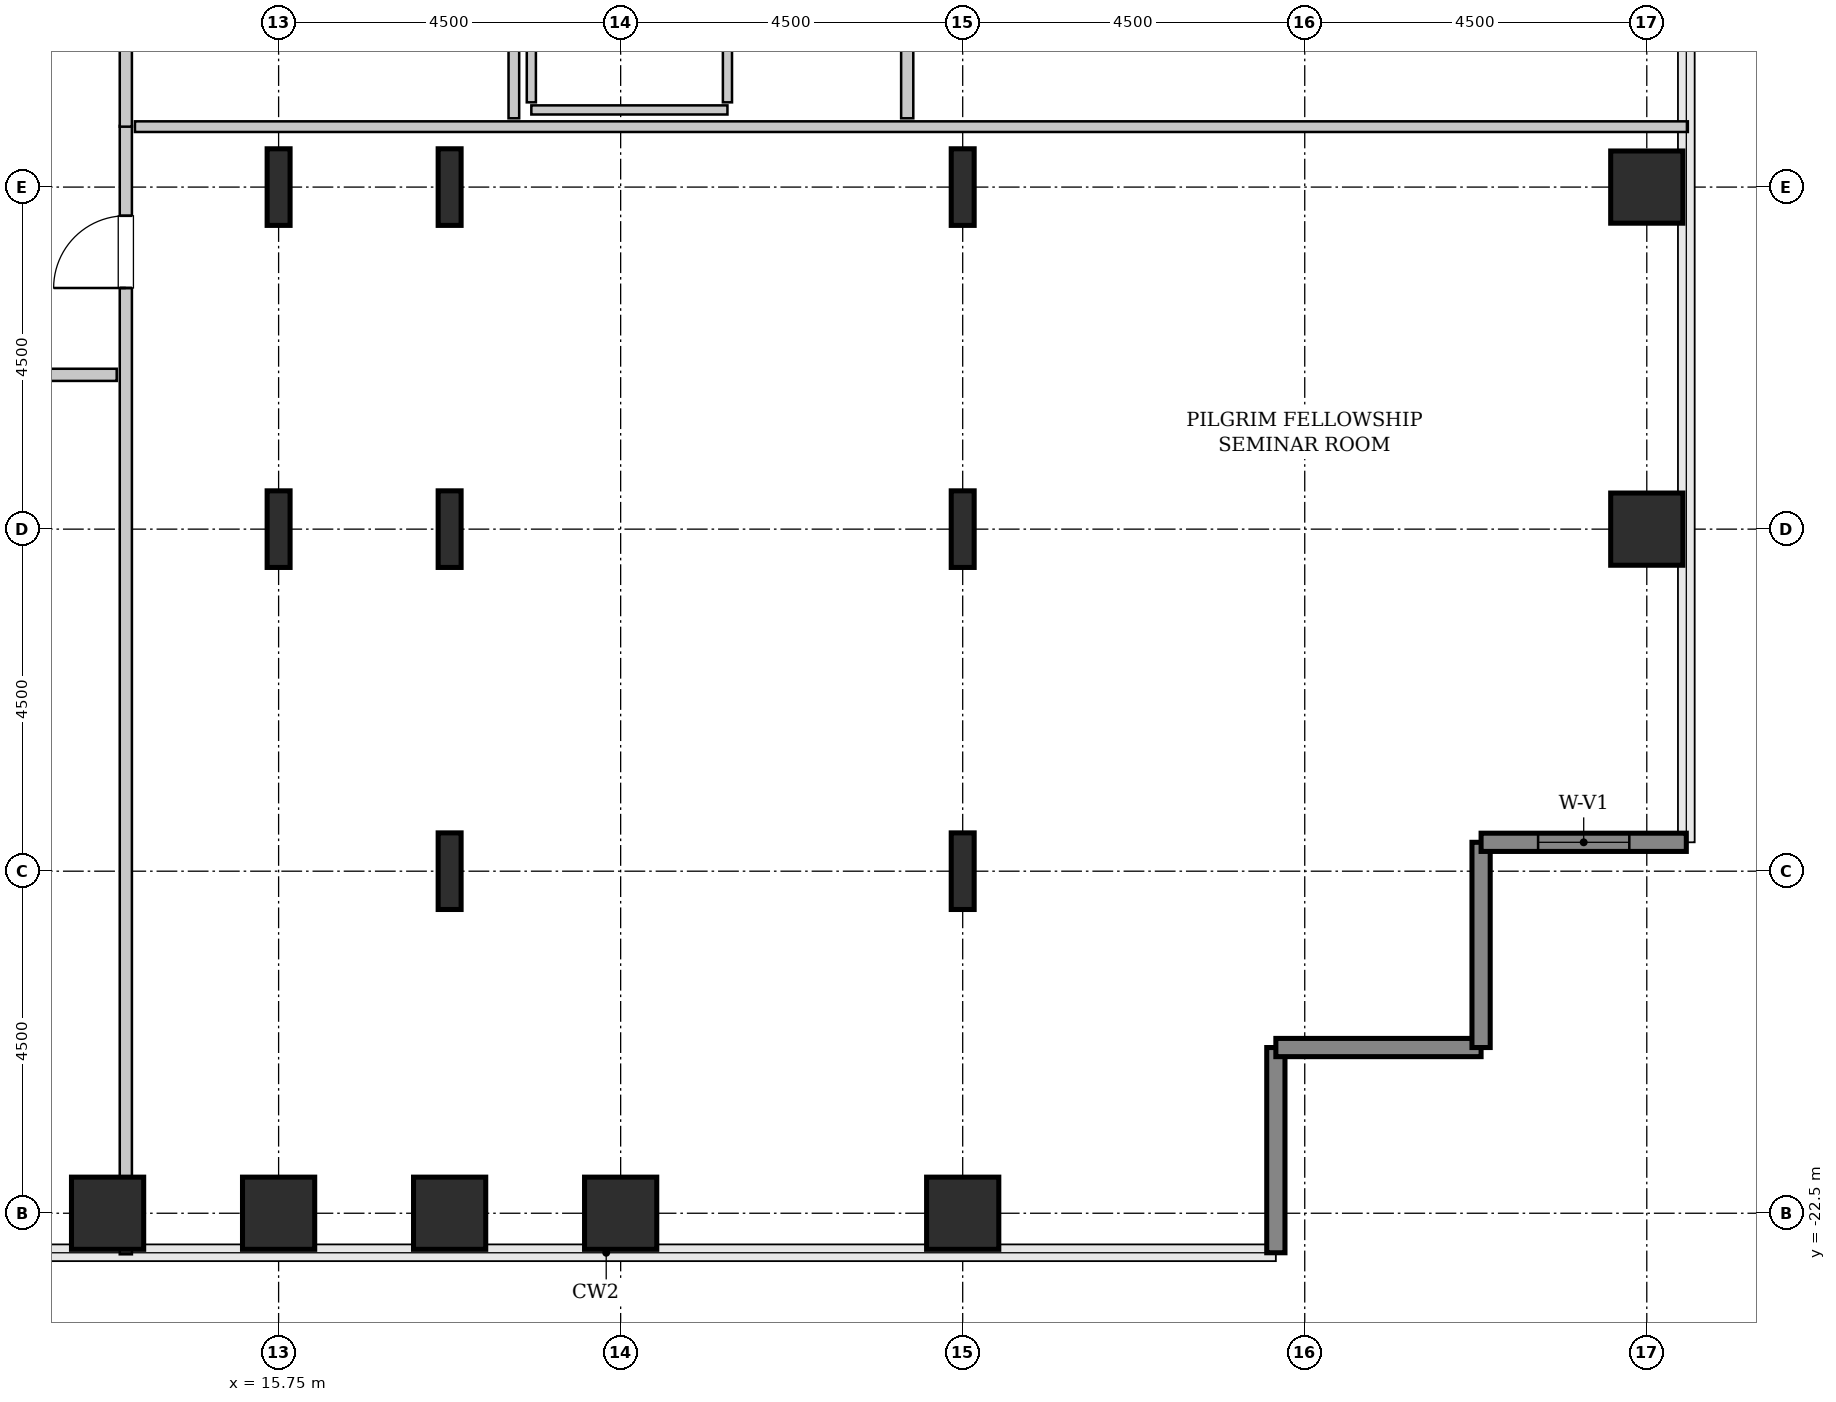
"""IFC4 building model, lengths in metres.
Left out: names, types, materials, properties, quantities, classifications, styles, units other than length and angle.
Written with IfcOpenShell. Run it as: python <this file> out.ifc"""

import sys

from ifc_helpers import new_model, si_unit, direction, frame, frame_2d, origin, origin_2d, place, context, subcontext, project, spatial, rectangle, hollow_rectangle, i_section, extrude, source, transform, mapped, element, fill, save


model = new_model("IFC4")
c1 = context("Model", 3, precision=1e-05, world=origin(), true_north=direction((0.0, 1.0)))
c2 = subcontext(c1, "Body", "Model", "MODEL_VIEW")
j1 = project(units=[si_unit("LENGTHUNIT", "METRE"), si_unit("PLANEANGLEUNIT", "RADIAN")], contexts=[c1])
p1 = place(None, origin())
s1 = spatial("IfcSite", under=j1, at=p1, CompositionType="ELEMENT")
p2 = place(p1, origin())
s2 = spatial("IfcBuilding", under=s1, at=p2, CompositionType="ELEMENT")
p3 = place(p2, frame((0.0, 0.0, 82.4)))
s3 = spatial("IfcBuildingStorey", under=s2, at=p3, CompositionType="ELEMENT", Elevation=82.4)
m1 = source(origin(), c2, "Body", "SweptSolid", [
    extrude(hollow_rectangle(XDim=0.95, YDim=0.95, WallThickness=0.045, InnerFilletRadius=0.045, OuterFilletRadius=0.09, at=origin_2d()), origin(), (0.0, 0.0, 1.0), 3.8),
])
for number, where, z_axis, x_axis in (
    (1, (13.5, -22.5, 0.0), (0.0, 0.0, 1.0), (1.0, 0.0, 0.0)),
    (2, (15.75, -22.5, 0.0), (0.0, 0.0, 1.0), (1.0, 0.0, 0.0)),
):
    element("IfcColumn", number, at=place(p3, frame(where, z_axis=z_axis, x_axis=x_axis)), inside=s3, PredefinedType="COLUMN", context=c2, shape_type="MappedRepresentation", body=[
        mapped(m1, transform((0.0, 0.0, 0.0), x_axis=(1.0, 0.0, 0.0), y_axis=(0.0, 1.0, 0.0), z_axis=(0.0, 0.0, 1.0), scale=1.0)),
    ])
m2 = source(origin(), c2, "Body", "SweptSolid", [
    extrude(i_section(OverallWidth=0.302, OverallDepth=1.008, WebThickness=0.021, FlangeThickness=0.04, FilletRadius=0.03, at=origin_2d()), origin(), (0.0, 0.0, 1.0), 3.8),
])
for number, where, z_axis, x_axis in (
    (3, (15.75, -13.5, 0.0), (0.0, 0.0, 1.0), (1.0, 0.0, 0.0)),
    (4, (15.75, -9.0, 0.0), (0.0, 0.0, 1.0), (1.0, 0.0, 0.0)),
):
    element("IfcColumn", number, at=place(p3, frame(where, z_axis=z_axis, x_axis=x_axis)), inside=s3, PredefinedType="COLUMN", context=c2, shape_type="MappedRepresentation", body=[
        mapped(m2, transform((0.0, 0.0, 0.0), x_axis=(1.0, 0.0, 0.0), y_axis=(0.0, 1.0, 0.0), z_axis=(0.0, 0.0, 1.0), scale=1.0)),
    ])
p4 = place(p3, frame((18.0, -22.5, 0.0), z_axis=(0.0, 0.0, 1.0), x_axis=(1.0, 0.0, 0.0)))
e5 = element("IfcColumn", 5, at=p4, inside=s3, PredefinedType="COLUMN", context=c2, shape_type="MappedRepresentation", body=[
    mapped(m1, transform((0.0, 0.0, 0.0), x_axis=(1.0, 0.0, 0.0), y_axis=(0.0, 1.0, 0.0), z_axis=(0.0, 0.0, 1.0), scale=1.0)),
])
for number, where, z_axis, x_axis in (
    (6, (18.0, -18.0, 0.0), (0.0, 0.0, 1.0), (1.0, 0.0, 0.0)),
    (7, (18.0, -13.5, 0.0), (0.0, 0.0, 1.0), (1.0, 0.0, 0.0)),
    (8, (18.0, -9.0, 0.0), (0.0, 0.0, 1.0), (1.0, 0.0, 0.0)),
):
    element("IfcColumn", number, at=place(p3, frame(where, z_axis=z_axis, x_axis=x_axis)), inside=s3, PredefinedType="COLUMN", context=c2, shape_type="MappedRepresentation", body=[
        mapped(m2, transform((0.0, 0.0, 0.0), x_axis=(1.0, 0.0, 0.0), y_axis=(0.0, 1.0, 0.0), z_axis=(0.0, 0.0, 1.0), scale=1.0)),
    ])
for number, where, z_axis, x_axis in (
    (9, (20.25, -22.5, 0.0), (0.0, 0.0, 1.0), (1.0, 0.0, 0.0)),
    (10, (24.75, -22.5, 0.0), (0.0, 0.0, 1.0), (1.0, 0.0, 0.0)),
):
    element("IfcColumn", number, at=place(p3, frame(where, z_axis=z_axis, x_axis=x_axis)), inside=s3, PredefinedType="COLUMN", context=c2, shape_type="MappedRepresentation", body=[
        mapped(m1, transform((0.0, 0.0, 0.0), x_axis=(1.0, 0.0, 0.0), y_axis=(0.0, 1.0, 0.0), z_axis=(0.0, 0.0, 1.0), scale=1.0)),
    ])
for number, where, z_axis, x_axis in (
    (11, (24.75, -18.0, 0.0), (0.0, 0.0, 1.0), (1.0, 0.0, 0.0)),
    (12, (24.75, -13.5, 0.0), (0.0, 0.0, 1.0), (1.0, 0.0, 0.0)),
    (13, (24.75, -9.0, 0.0), (0.0, 0.0, 1.0), (1.0, 0.0, 0.0)),
):
    element("IfcColumn", number, at=place(p3, frame(where, z_axis=z_axis, x_axis=x_axis)), inside=s3, PredefinedType="COLUMN", context=c2, shape_type="MappedRepresentation", body=[
        mapped(m2, transform((0.0, 0.0, 0.0), x_axis=(1.0, 0.0, 0.0), y_axis=(0.0, 1.0, 0.0), z_axis=(0.0, 0.0, 1.0), scale=1.0)),
    ])
for number, where, z_axis, x_axis in (
    (14, (33.75, -13.5, 0.0), (0.0, 0.0, 1.0), (1.0, 0.0, 0.0)),
    (15, (33.75, -9.0, 0.0), (0.0, 0.0, 1.0), (1.0, 0.0, 0.0)),
):
    element("IfcColumn", number, at=place(p3, frame(where, z_axis=z_axis, x_axis=x_axis)), inside=s3, PredefinedType="COLUMN", context=c2, shape_type="MappedRepresentation", body=[
        mapped(m1, transform((0.0, 0.0, 0.0), x_axis=(1.0, 0.0, 0.0), y_axis=(0.0, 1.0, 0.0), z_axis=(0.0, 0.0, 1.0), scale=1.0)),
    ])
m3 = source(origin(), c2, "Body", "SweptSolid", [
    extrude(rectangle(XDim=2.7, YDim=0.24, at=frame_2d((1.35, 0.0))), origin(), (0.0, 0.0, 1.0), 3.5),
])
for number, where, z_axis, x_axis in (
    (16, (28.87, -23.02, 0.0), (0.0, 0.0, 1.0), (0.0, 1.0, 0.0)),
    (17, (28.87, -20.32, 0.0), (0.0, 0.0, 1.0), (1.0, 0.0, 0.0)),
    (18, (31.57, -20.32, 0.0), (0.0, 0.0, 1.0), (0.0, 1.0, 0.0)),
):
    element("IfcWall", number, at=place(p3, frame(where, z_axis=z_axis, x_axis=x_axis)), inside=s3, PredefinedType="SHEAR", context=c2, shape_type="MappedRepresentation", body=[
        mapped(m3, transform((0.0, 0.0, 0.0), x_axis=(1.0, 0.0, 0.0), y_axis=(0.0, 1.0, 0.0), z_axis=(0.0, 0.0, 1.0), scale=1.0)),
    ])
p5 = place(p3, frame((31.57, -17.62, 0.0), z_axis=(0.0, 0.0, 1.0), x_axis=(1.0, 0.0, 0.0)))
e19 = element("IfcWall", 19, at=p5, inside=s3, PredefinedType="SHEAR", context=c2, shape_type="MappedRepresentation", body=[
    mapped(m3, transform((0.0, 0.0, 0.0), x_axis=(1.0, 0.0, 0.0), y_axis=(0.0, 1.0, 0.0), z_axis=(0.0, 0.0, 1.0), scale=1.0)),
])
p6 = place(p5, frame((0.75, 0.0, 0.85)))
e20 = element("IfcOpeningElement", 20, at=p6, cuts=e19, PredefinedType="OPENING", context=c2, shape_type="SweptSolid", body=[
    extrude(rectangle(XDim=1.2, YDim=1.8, at=frame_2d((0.6, 0.9))), frame((0.0, 0.13, 0.0), z_axis=(0.0, -1.0, 0.0), x_axis=(1.0, 0.0, 0.0)), (0.0, 0.0, 1.0), 0.26),
])
m4 = source(origin(), c2, "Body", "SweptSolid", [
    extrude(rectangle(XDim=2.58, YDim=0.12, at=frame_2d((1.29, 0.0))), origin(), (0.0, 0.0, 1.0), 3.485),
])
p7 = place(p3, frame((19.075, -7.985, 0.0), z_axis=(0.0, 0.0, 1.0), x_axis=(1.0, 0.0, 0.0)))
e21 = element("IfcWall", 21, at=p7, inside=s3, PredefinedType="PLUMBINGWALL", context=c2, shape_type="MappedRepresentation", body=[
    mapped(m4, transform((0.0, 0.0, 0.0), x_axis=(1.0, 0.0, 0.0), y_axis=(0.0, 1.0, 0.0), z_axis=(0.0, 0.0, 1.0), scale=1.0)),
])
m5 = source(origin(), c2, "Body", "SweptSolid", [
    extrude(rectangle(XDim=2.48, YDim=0.12, at=frame_2d((1.24, 0.0))), origin(), (0.0, 0.0, 1.0), 3.485),
])
p8 = place(p3, frame((21.655, -7.885, 0.0), z_axis=(0.0, 0.0, 1.0), x_axis=(0.0, 1.0, 0.0)))
e22 = element("IfcWall", 22, at=p8, inside=s3, PredefinedType="PLUMBINGWALL", context=c2, shape_type="MappedRepresentation", body=[
    mapped(m5, transform((0.0, 0.0, 0.0), x_axis=(1.0, 0.0, 0.0), y_axis=(0.0, 1.0, 0.0), z_axis=(0.0, 0.0, 1.0), scale=1.0)),
])
p9 = place(p8, frame((0.815, 0.0, 0.0)))
e23 = element("IfcOpeningElement", 23, at=p9, cuts=e22, PredefinedType="OPENING", context=c2, shape_type="SweptSolid", body=[
    extrude(rectangle(XDim=0.85, YDim=2.1, at=frame_2d((0.425, 1.05))), frame((0.0, 0.07, 0.0), z_axis=(0.0, -1.0, 0.0), x_axis=(1.0, 0.0, 0.0)), (0.0, 0.0, 1.0), 0.14),
])
m6 = source(origin(), c2, "Body", "SweptSolid", [
    extrude(rectangle(XDim=2.38, YDim=0.12, at=frame_2d((1.19, 0.0))), origin(), (0.0, 0.0, 1.0), 3.485),
])
p10 = place(p3, frame((19.075, -7.885, 0.0), z_axis=(0.0, 0.0, 1.0), x_axis=(0.0, 1.0, 0.0)))
e24 = element("IfcWall", 24, at=p10, inside=s3, PredefinedType="PLUMBINGWALL", context=c2, shape_type="MappedRepresentation", body=[
    mapped(m6, transform((0.0, 0.0, 0.0), x_axis=(1.0, 0.0, 0.0), y_axis=(0.0, 1.0, 0.0), z_axis=(0.0, 0.0, 1.0), scale=1.0)),
])
m7 = source(origin(), c2, "Body", "SweptSolid", [
    extrude(rectangle(XDim=14.845, YDim=0.16, at=frame_2d((7.422, 0.0))), origin(), (0.0, 0.0, 1.0), 3.485),
])
p11 = place(p3, frame((13.74, -23.04, 0.0), z_axis=(0.0, 0.0, 1.0), x_axis=(0.0, 1.0, 0.0)))
e25 = element("IfcWall", 25, at=p11, inside=s3, PredefinedType="PARTITIONING", context=c2, shape_type="MappedRepresentation", body=[
    mapped(m7, transform((0.0, 0.0, 0.0), x_axis=(1.0, 0.0, 0.0), y_axis=(0.0, 1.0, 0.0), z_axis=(0.0, 0.0, 1.0), scale=1.0)),
])
p12 = place(p11, frame((12.712, 0.0, 0.0)))
e26 = element("IfcOpeningElement", 26, at=p12, cuts=e25, PredefinedType="OPENING", context=c2, shape_type="SweptSolid", body=[
    extrude(rectangle(XDim=0.95, YDim=2.1, at=frame_2d((0.475, 1.05))), frame((0.0, 0.09, 0.0), z_axis=(0.0, -1.0, 0.0), x_axis=(1.0, 0.0, 0.0)), (0.0, 0.0, 1.0), 0.18),
])
m8 = source(origin(), c2, "Body", "SweptSolid", [
    extrude(rectangle(XDim=20.43, YDim=0.14, at=frame_2d((10.215, 0.0))), origin(), (0.0, 0.0, 1.0), 3.485),
])
p13 = place(p3, frame((13.86, -8.205, 0.0), z_axis=(0.0, 0.0, 1.0), x_axis=(1.0, 0.0, 0.0)))
e27 = element("IfcWall", 27, at=p13, inside=s3, PredefinedType="PARTITIONING", context=c2, shape_type="MappedRepresentation", body=[
    mapped(m8, transform((0.0, 0.0, 0.0), x_axis=(1.0, 0.0, 0.0), y_axis=(0.0, 1.0, 0.0), z_axis=(0.0, 0.0, 1.0), scale=1.0)),
])
m9 = source(origin(), c2, "Body", "SweptSolid", [
    extrude(rectangle(XDim=15.7, YDim=0.16, at=frame_2d((7.85, 0.0))), origin(), (0.0, 0.0, 1.0), 3.485),
])
p14 = place(p3, frame((24.02, -8.095, 0.0), z_axis=(0.0, 0.0, 1.0), x_axis=(0.0, 1.0, 0.0)))
e28 = element("IfcWall", 28, at=p14, inside=s3, PredefinedType="PARTITIONING", context=c2, shape_type="MappedRepresentation", body=[
    mapped(m9, transform((0.0, 0.0, 0.0), x_axis=(1.0, 0.0, 0.0), y_axis=(0.0, 1.0, 0.0), z_axis=(0.0, 0.0, 1.0), scale=1.0)),
])
p15 = place(p14, frame((9.87, 0.0, 0.0)))
e29 = element("IfcOpeningElement", 29, at=p15, cuts=e28, PredefinedType="OPENING", context=c2, shape_type="SweptSolid", body=[
    extrude(rectangle(XDim=0.95, YDim=2.1, at=frame_2d((0.475, 1.05))), frame((0.0, 0.09, 0.0), z_axis=(0.0, -1.0, 0.0), x_axis=(1.0, 0.0, 0.0)), (0.0, 0.0, 1.0), 0.18),
])
m10 = source(origin(), c2, "Body", "SweptSolid", [
    extrude(rectangle(XDim=9.595, YDim=0.16, at=frame_2d((4.797, 0.0))), origin(), (0.0, 0.0, 1.0), 3.485),
])
p16 = place(p3, frame((13.74, -8.205, 0.0), z_axis=(0.0, 0.0, 1.0), x_axis=(0.0, 1.0, 0.0)))
e30 = element("IfcWall", 30, at=p16, inside=s3, PredefinedType="PARTITIONING", context=c2, shape_type="MappedRepresentation", body=[
    mapped(m10, transform((0.0, 0.0, 0.0), x_axis=(1.0, 0.0, 0.0), y_axis=(0.0, 1.0, 0.0), z_axis=(0.0, 0.0, 1.0), scale=1.0)),
])
p17 = place(p16, frame((4.323, 0.0, 0.0)))
e31 = element("IfcOpeningElement", 31, at=p17, cuts=e30, PredefinedType="OPENING", context=c2, shape_type="SweptSolid", body=[
    extrude(rectangle(XDim=0.95, YDim=2.1, at=frame_2d((0.475, 1.05))), frame((0.0, 0.09, 0.0), z_axis=(0.0, -1.0, 0.0), x_axis=(1.0, 0.0, 0.0)), (0.0, 0.0, 1.0), 0.18),
])
m11 = source(origin(), c2, "Body", "SweptSolid", [
    extrude(rectangle(XDim=9.365, YDim=0.14, at=frame_2d((4.683, 0.0))), origin(), (0.0, 0.0, 1.0), 3.485),
])
p18 = place(p3, frame((18.845, -8.095, 0.0), z_axis=(0.0, 0.0, 1.0), x_axis=(0.0, 1.0, 0.0)))
e32 = element("IfcWall", 32, at=p18, inside=s3, PredefinedType="PARTITIONING", context=c2, shape_type="MappedRepresentation", body=[
    mapped(m11, transform((0.0, 0.0, 0.0), x_axis=(1.0, 0.0, 0.0), y_axis=(0.0, 1.0, 0.0), z_axis=(0.0, 0.0, 1.0), scale=1.0)),
])
m12 = source(origin(), c2, "Body", "SweptSolid", [
    extrude(rectangle(XDim=4.46, YDim=0.16, at=frame_2d((2.23, 0.0))), origin(), (0.0, 0.0, 1.0), 3.485),
])
p19 = place(p3, frame((9.16, -11.47, 0.0), z_axis=(0.0, 0.0, 1.0), x_axis=(1.0, 0.0, 0.0)))
e33 = element("IfcWall", 33, at=p19, inside=s3, PredefinedType="PARTITIONING", context=c2, shape_type="MappedRepresentation", body=[
    mapped(m12, transform((0.0, 0.0, 0.0), x_axis=(1.0, 0.0, 0.0), y_axis=(0.0, 1.0, 0.0), z_axis=(0.0, 0.0, 1.0), scale=1.0)),
])
p20 = place(p19, frame((1.755, 0.0, 0.0)))
e34 = element("IfcOpeningElement", 34, at=p20, cuts=e33, PredefinedType="OPENING", context=c2, shape_type="SweptSolid", body=[
    extrude(rectangle(XDim=0.95, YDim=2.1, at=frame_2d((0.475, 1.05))), frame((0.0, 0.09, 0.0), z_axis=(0.0, -1.0, 0.0), x_axis=(1.0, 0.0, 0.0)), (0.0, 0.0, 1.0), 0.18),
])
m13 = source(origin(), c2, "Body", "SweptSolid", [
    extrude(rectangle(XDim=1.2, YDim=1.8, at=frame_2d((0.6, 0.9))), frame((0.0, 0.03, 0.0), z_axis=(0.0, -1.0, 0.0), x_axis=(1.0, 0.0, 0.0)), (0.0, 0.0, 1.0), 0.06),
])
p21 = place(p6, origin())
e35 = element("IfcWindow", 35, at=p21, inside=s3, PartitioningType="SINGLE_PANEL", PredefinedType="WINDOW", context=c2, shape_type="MappedRepresentation", body=[
    mapped(m13, transform((0.0, 0.0, 0.0), x_axis=(1.0, 0.0, 0.0), y_axis=(0.0, 1.0, 0.0), z_axis=(0.0, 0.0, 1.0), scale=1.0)),
])
fill(e20, e35)
m14 = source(origin(), c2, "Body", "SweptSolid", [
    extrude(rectangle(XDim=0.95, YDim=2.1, at=frame_2d((0.475, 1.05))), frame((0.0, 0.025, 0.0), z_axis=(0.0, -1.0, 0.0), x_axis=(1.0, 0.0, 0.0)), (0.0, 0.0, 1.0), 0.05),
])
p22 = place(p12, origin())
e36 = element("IfcDoor", 36, at=p22, inside=s3, OperationType="SINGLE_SWING_LEFT", PredefinedType="DOOR", context=c2, shape_type="MappedRepresentation", body=[
    mapped(m14, transform((0.0, 0.0, 0.0), x_axis=(1.0, 0.0, 0.0), y_axis=(0.0, 1.0, 0.0), z_axis=(0.0, 0.0, 1.0), scale=1.0)),
])
fill(e26, e36)
save(model, sys.argv[1])
